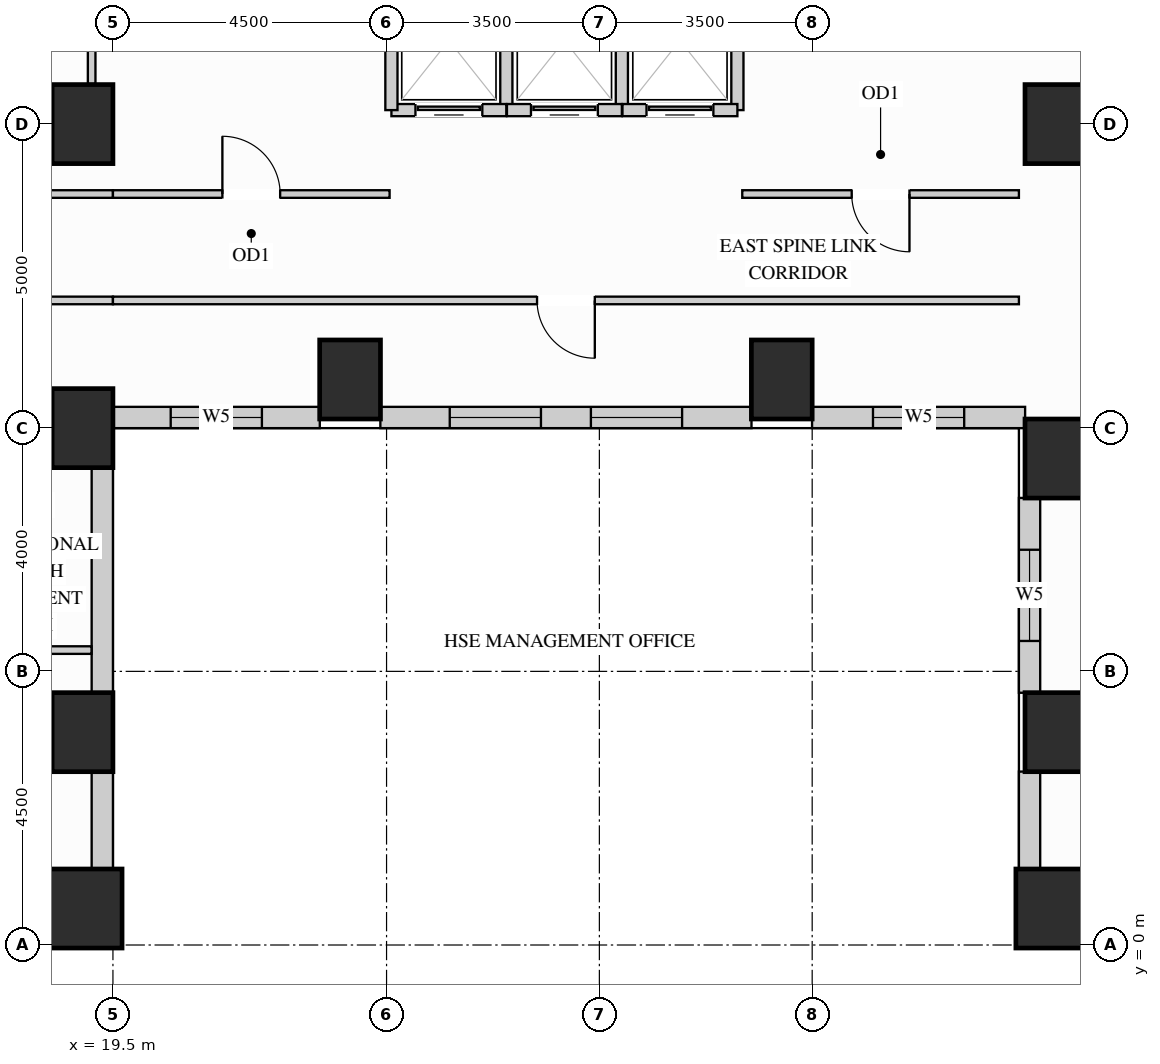
"""IFC4 building model, lengths in metres.
Left out: names, types, materials, properties, quantities, classifications, styles, units other than length and angle.
Written with IfcOpenShell. Run it as: python <this file> out.ifc"""

import sys

from ifc_helpers import new_model, si_unit, direction, frame, frame_2d, origin, origin_2d, place, context, subcontext, project, spatial, rectangle, extrude, source, transform, mapped, element, fill, save


model = new_model("IFC4")
c1 = context("Model", 3, precision=1e-05, world=origin(), true_north=direction((0.0, 1.0)))
c2 = subcontext(c1, "Body", "Model", "MODEL_VIEW")
j1 = project(units=[si_unit("LENGTHUNIT", "METRE"), si_unit("PLANEANGLEUNIT", "RADIAN")], contexts=[c1])
p1 = place(None, origin())
s1 = spatial("IfcSite", under=j1, at=p1, CompositionType="ELEMENT")
p2 = place(p1, origin())
s2 = spatial("IfcBuilding", under=s1, at=p2, CompositionType="ELEMENT")
p3 = place(p2, frame((0.0, 0.0, 54.9)))
s3 = spatial("IfcBuildingStorey", under=s2, at=p3, CompositionType="ELEMENT", Elevation=54.9)
m1 = source(origin(), c2, "Body", "SweptSolid", [
    extrude(rectangle(XDim=1.0, YDim=1.3, at=origin_2d()), origin(), (0.0, 0.0, 1.0), 3.38),
])
for number, where, z_axis, x_axis in (
    (1, (19.0, 13.5, 0.0), (0.0, 0.0, 1.0), (1.0, 0.0, 0.0)),
    (2, (19.0, 3.5, 0.0), (0.0, 0.0, 1.0), (1.0, 0.0, 0.0)),
    (3, (19.0, 8.5, 0.0), (0.0, 0.0, 1.0), (1.0, 0.0, 0.0)),
    (4, (35.0, 13.5, 0.0), (0.0, 0.0, 1.0), (1.0, 0.0, 0.0)),
    (5, (35.0, 3.5, 0.0), (0.0, 0.0, 1.0), (1.0, 0.0, 0.0)),
    (6, (35.0, 8.0, 0.0), (0.0, 0.0, 1.0), (1.0, 0.0, 0.0)),
    (7, (23.4, 9.3, 0.0), (0.0, 0.0, 1.0), (1.0, 0.0, 0.0)),
    (8, (30.5, 9.3, 0.0), (0.0, 0.0, 1.0), (1.0, 0.0, 0.0)),
):
    element("IfcColumn", number, at=place(p3, frame(where, z_axis=z_axis, x_axis=x_axis)), inside=s3, PredefinedType="COLUMN", context=c2, shape_type="MappedRepresentation", body=[
        mapped(m1, transform((0.0, 0.0, 0.0), x_axis=(1.0, 0.0, 0.0), y_axis=(0.0, 1.0, 0.0), z_axis=(0.0, 0.0, 1.0))),
    ])
m2 = source(origin(), c2, "Body", "SweptSolid", [
    extrude(rectangle(XDim=1.3, YDim=1.3, at=origin_2d()), origin(), (0.0, 0.0, 1.0), 3.38),
])
for number, where, z_axis, x_axis in (
    (9, (19.0, 0.6, 0.0), (0.0, 0.0, 1.0), (1.0, 0.0, 0.0)),
    (10, (35.0, 0.6, 0.0), (0.0, 0.0, 1.0), (1.0, 0.0, 0.0)),
):
    element("IfcColumn", number, at=place(p3, frame(where, z_axis=z_axis, x_axis=x_axis)), inside=s3, PredefinedType="COLUMN", context=c2, shape_type="MappedRepresentation", body=[
        mapped(m2, transform((0.0, 0.0, 0.0), x_axis=(1.0, 0.0, 0.0), y_axis=(0.0, 1.0, 0.0), z_axis=(0.0, 0.0, 1.0))),
    ])
m3 = source(origin(), c2, "Body", "SweptSolid", [
    extrude(rectangle(XDim=1.604, YDim=0.35, at=frame_2d((0.802, 0.0))), origin(), (0.0, 0.0, 1.0), 2.51),
])
p4 = place(p3, frame((19.325, 1.248, 0.0), z_axis=(0.0, 0.0, 1.0), x_axis=(0.0, 1.0, 0.0)))
e11 = element("IfcWall", 11, at=p4, inside=s3, PredefinedType="SOLIDWALL", context=c2, shape_type="MappedRepresentation", body=[
    mapped(m3, transform((0.0, 0.0, 0.0), x_axis=(1.0, 0.0, 0.0), y_axis=(0.0, 1.0, 0.0), z_axis=(0.0, 0.0, 1.0))),
])
m4 = source(origin(), c2, "Body", "SweptSolid", [
    extrude(rectangle(XDim=3.704, YDim=0.35, at=frame_2d((1.852, 0.0))), origin(), (0.0, 0.0, 1.0), 2.51),
])
p5 = place(p3, frame((19.325, 4.148, 0.0), z_axis=(0.0, 0.0, 1.0), x_axis=(0.0, 1.0, 0.0)))
e12 = element("IfcWall", 12, at=p5, inside=s3, PredefinedType="SOLIDWALL", context=c2, shape_type="MappedRepresentation", body=[
    mapped(m4, transform((0.0, 0.0, 0.0), x_axis=(1.0, 0.0, 0.0), y_axis=(0.0, 1.0, 0.0), z_axis=(0.0, 0.0, 1.0))),
])
p6 = place(p3, frame((19.498, 8.675, 0.0), z_axis=(0.0, 0.0, 1.0), x_axis=(1.0, 0.0, 0.0)))
e13 = element("IfcWall", 13, at=p6, inside=s3, PredefinedType="SOLIDWALL", context=c2, shape_type="SweptSolid", body=[
    extrude(rectangle(XDim=3.404, YDim=0.35, at=frame_2d((1.702, 0.0))), origin(), (0.0, 0.0, 1.0), 3.365),
])
p7 = place(p6, frame((0.952, 0.0, 0.78)))
e14 = element("IfcOpeningElement", 14, at=p7, cuts=e13, PredefinedType="OPENING", context=c2, shape_type="SweptSolid", body=[
    extrude(rectangle(XDim=1.5, YDim=2.0, at=frame_2d((0.75, 1.0))), frame((0.0, 0.185, 0.0), z_axis=(0.0, -1.0, 0.0), x_axis=(1.0, 0.0, 0.0)), (0.0, 0.0, 1.0), 0.37),
])
p8 = place(p3, frame((23.898, 8.675, 0.0), z_axis=(0.0, 0.0, 1.0), x_axis=(1.0, 0.0, 0.0)))
e15 = element("IfcWall", 15, at=p8, inside=s3, PredefinedType="SOLIDWALL", context=c2, shape_type="SweptSolid", body=[
    extrude(rectangle(XDim=6.104, YDim=0.35, at=frame_2d((3.052, 0.0))), origin(), (0.0, 0.0, 1.0), 3.365),
])
p9 = place(p8, frame((1.141, 0.0, 0.78)))
e16 = element("IfcOpeningElement", 16, at=p9, cuts=e15, PredefinedType="OPENING", context=c2, shape_type="SweptSolid", body=[
    extrude(rectangle(XDim=1.5, YDim=2.0, at=frame_2d((0.75, 1.0))), frame((0.0, 0.185, 0.0), z_axis=(0.0, -1.0, 0.0), x_axis=(1.0, 0.0, 0.0)), (0.0, 0.0, 1.0), 0.37),
])
p10 = place(p8, frame((3.463, 0.0, 0.78)))
e17 = element("IfcOpeningElement", 17, at=p10, cuts=e15, PredefinedType="OPENING", context=c2, shape_type="SweptSolid", body=[
    extrude(rectangle(XDim=1.5, YDim=2.0, at=frame_2d((0.75, 1.0))), frame((0.0, 0.185, 0.0), z_axis=(0.0, -1.0, 0.0), x_axis=(1.0, 0.0, 0.0)), (0.0, 0.0, 1.0), 0.37),
])
p11 = place(p3, frame((30.998, 8.675, 0.0), z_axis=(0.0, 0.0, 1.0), x_axis=(1.0, 0.0, 0.0)))
e18 = element("IfcWall", 18, at=p11, inside=s3, PredefinedType="SOLIDWALL", context=c2, shape_type="SweptSolid", body=[
    extrude(rectangle(XDim=3.504, YDim=0.35, at=frame_2d((1.752, 0.0))), origin(), (0.0, 0.0, 1.0), 3.365),
])
p12 = place(p11, frame((1.002, 0.0, 0.78)))
e19 = element("IfcOpeningElement", 19, at=p12, cuts=e18, PredefinedType="OPENING", context=c2, shape_type="SweptSolid", body=[
    extrude(rectangle(XDim=1.5, YDim=2.0, at=frame_2d((0.75, 1.0))), frame((0.0, 0.185, 0.0), z_axis=(0.0, -1.0, 0.0), x_axis=(1.0, 0.0, 0.0)), (0.0, 0.0, 1.0), 0.37),
])
p13 = place(p3, frame((34.575, 7.352, 0.0), z_axis=(0.0, 0.0, 1.0), x_axis=(0.0, -1.0, 0.0)))
e20 = element("IfcWall", 20, at=p13, inside=s3, PredefinedType="SOLIDWALL", context=c2, shape_type="SweptSolid", body=[
    extrude(rectangle(XDim=3.204, YDim=0.35, at=frame_2d((1.602, 0.0))), origin(), (0.0, 0.0, 1.0), 2.51),
])
p14 = place(p13, frame((0.852, 0.0, 0.78)))
e21 = element("IfcOpeningElement", 21, at=p14, cuts=e20, PredefinedType="OPENING", context=c2, shape_type="SweptSolid", body=[
    extrude(rectangle(XDim=1.5, YDim=1.55, at=frame_2d((0.75, 0.775))), frame((0.0, 0.185, 0.0), z_axis=(0.0, -1.0, 0.0), x_axis=(1.0, 0.0, 0.0)), (0.0, 0.0, 1.0), 0.37),
])
p15 = place(p3, frame((34.575, 2.852, 0.0), z_axis=(0.0, 0.0, 1.0), x_axis=(0.0, -1.0, 0.0)))
e22 = element("IfcWall", 22, at=p15, inside=s3, PredefinedType="SOLIDWALL", context=c2, shape_type="MappedRepresentation", body=[
    mapped(m3, transform((0.0, 0.0, 0.0), x_axis=(1.0, 0.0, 0.0), y_axis=(0.0, 1.0, 0.0), z_axis=(0.0, 0.0, 1.0))),
])
m5 = source(origin(), c2, "Body", "SweptSolid", [
    extrude(rectangle(XDim=3.18, YDim=0.125, at=frame_2d((1.59, 0.0))), origin(), (0.0, 0.0, 1.0), 2.67),
])
p16 = place(p3, frame((19.15, 14.16, 0.0), z_axis=(0.0, 0.0, 1.0), x_axis=(0.0, 1.0, 0.0)))
e23 = element("IfcWall", 23, at=p16, inside=s3, PredefinedType="PARTITIONING", context=c2, shape_type="MappedRepresentation", body=[
    mapped(m5, transform((0.0, 0.0, 0.0), x_axis=(1.0, 0.0, 0.0), y_axis=(0.0, 1.0, 0.0), z_axis=(0.0, 0.0, 1.0))),
])
p17 = place(p3, frame((29.85, 12.35, 0.0), z_axis=(0.0, 0.0, 1.0), x_axis=(1.0, 0.0, 0.0)))
e24 = element("IfcWall", 24, at=p17, inside=s3, PredefinedType="PARTITIONING", context=c2, shape_type="SweptSolid", body=[
    extrude(rectangle(XDim=4.55, YDim=0.125, at=frame_2d((2.275, 0.0))), origin(), (0.0, 0.0, 1.0), 3.365),
])
p18 = place(p17, frame((1.8, 0.0, 0.0)))
e25 = element("IfcOpeningElement", 25, at=p18, cuts=e24, PredefinedType="OPENING", context=c2, shape_type="SweptSolid", body=[
    extrude(rectangle(XDim=0.95, YDim=2.15, at=frame_2d((0.475, 1.075))), frame((0.0, 0.073, 0.0), z_axis=(0.0, -1.0, 0.0), x_axis=(1.0, 0.0, 0.0)), (0.0, 0.0, 1.0), 0.145),
])
m6 = source(origin(), c2, "Body", "SweptSolid", [
    extrude(rectangle(XDim=2.45, YDim=0.125, at=frame_2d((1.225, 0.0))), origin(), (0.0, 0.0, 1.0), 3.365),
])
p19 = place(p3, frame((17.05, 12.35, 0.0), z_axis=(0.0, 0.0, 1.0), x_axis=(1.0, 0.0, 0.0)))
e26 = element("IfcWall", 26, at=p19, inside=s3, PredefinedType="PARTITIONING", context=c2, shape_type="MappedRepresentation", body=[
    mapped(m6, transform((0.0, 0.0, 0.0), x_axis=(1.0, 0.0, 0.0), y_axis=(0.0, 1.0, 0.0), z_axis=(0.0, 0.0, 1.0))),
])
p20 = place(p3, frame((19.5, 12.35, 0.0), z_axis=(0.0, 0.0, 1.0), x_axis=(1.0, 0.0, 0.0)))
e27 = element("IfcWall", 27, at=p20, inside=s3, PredefinedType="PARTITIONING", context=c2, shape_type="SweptSolid", body=[
    extrude(rectangle(XDim=4.55, YDim=0.125, at=frame_2d((2.275, 0.0))), origin(), (0.0, 0.0, 1.0), 3.365),
])
p21 = place(p20, frame((1.8, 0.0, 0.0)))
e28 = element("IfcOpeningElement", 28, at=p21, cuts=e27, PredefinedType="OPENING", context=c2, shape_type="SweptSolid", body=[
    extrude(rectangle(XDim=0.95, YDim=2.15, at=frame_2d((0.475, 1.075))), frame((0.0, 0.073, 0.0), z_axis=(0.0, -1.0, 0.0), x_axis=(1.0, 0.0, 0.0)), (0.0, 0.0, 1.0), 0.145),
])
p22 = place(p3, frame((17.05, 10.6, 0.0), z_axis=(0.0, 0.0, 1.0), x_axis=(1.0, 0.0, 0.0)))
e29 = element("IfcWall", 29, at=p22, inside=s3, PredefinedType="PARTITIONING", context=c2, shape_type="MappedRepresentation", body=[
    mapped(m6, transform((0.0, 0.0, 0.0), x_axis=(1.0, 0.0, 0.0), y_axis=(0.0, 1.0, 0.0), z_axis=(0.0, 0.0, 1.0))),
])
p23 = place(p3, frame((19.5, 10.6, 0.0), z_axis=(0.0, 0.0, 1.0), x_axis=(1.0, 0.0, 0.0)))
e30 = element("IfcWall", 30, at=p23, inside=s3, PredefinedType="PARTITIONING", context=c2, shape_type="SweptSolid", body=[
    extrude(rectangle(XDim=14.9, YDim=0.125, at=frame_2d((7.45, 0.0))), origin(), (0.0, 0.0, 1.0), 3.365),
])
p24 = place(p23, frame((6.975, 0.0, 0.0)))
e31 = element("IfcOpeningElement", 31, at=p24, cuts=e30, PredefinedType="OPENING", context=c2, shape_type="SweptSolid", body=[
    extrude(rectangle(XDim=0.95, YDim=2.15, at=frame_2d((0.475, 1.075))), frame((0.0, 0.073, 0.0), z_axis=(0.0, -1.0, 0.0), x_axis=(1.0, 0.0, 0.0)), (0.0, 0.0, 1.0), 0.145),
])
m7 = source(origin(), c2, "Body", "SweptSolid", [
    extrude(rectangle(XDim=2.098, YDim=0.125, at=frame_2d((1.049, 0.0))), origin(), (0.0, 0.0, 1.0), 2.828),
])
p25 = place(p3, frame((17.05, 4.85, 0.0), z_axis=(0.0, 0.0, 1.0), x_axis=(1.0, 0.0, 0.0)))
e32 = element("IfcWall", 32, at=p25, inside=s3, PredefinedType="PARTITIONING", context=c2, shape_type="MappedRepresentation", body=[
    mapped(m7, transform((0.0, 0.0, 0.0), x_axis=(1.0, 0.0, 0.0), y_axis=(0.0, 1.0, 0.0), z_axis=(0.0, 0.0, 1.0))),
])
m8 = source(origin(), c2, "Body", "SweptSolid", [
    extrude(rectangle(XDim=2.29, YDim=0.2, at=frame_2d((1.145, 0.0))), origin(), (0.0, 0.0, 1.0), 3.365),
])
p26 = place(p3, frame((25.97, 13.73, 0.0), z_axis=(0.0, 0.0, 1.0), x_axis=(0.0, 1.0, 0.0)))
e33 = element("IfcWall", 33, at=p26, inside=s3, PredefinedType="PARTITIONING", context=c2, shape_type="MappedRepresentation", body=[
    mapped(m8, transform((0.0, 0.0, 0.0), x_axis=(1.0, 0.0, 0.0), y_axis=(0.0, 1.0, 0.0), z_axis=(0.0, 0.0, 1.0))),
])
p27 = place(p3, frame((24.08, 13.73, 0.0), z_axis=(0.0, 0.0, 1.0), x_axis=(1.0, 0.0, 0.0)))
e34 = element("IfcWall", 34, at=p27, inside=s3, PredefinedType="PARTITIONING", context=c2, shape_type="SweptSolid", body=[
    extrude(rectangle(XDim=1.89, YDim=0.2, at=frame_2d((0.945, 0.0))), origin(), (0.0, 0.0, 1.0), 2.446),
])
p28 = place(p27, frame((0.395, 0.0, 0.0)))
e35 = element("IfcOpeningElement", 35, at=p28, cuts=e34, PredefinedType="OPENING", context=c2, shape_type="SweptSolid", body=[
    extrude(rectangle(XDim=1.1, YDim=2.2, at=frame_2d((0.55, 1.1))), frame((0.0, 0.11, 0.0), z_axis=(0.0, -1.0, 0.0), x_axis=(1.0, 0.0, 0.0)), (0.0, 0.0, 1.0), 0.22),
])
for number, where, z_axis, x_axis in (
    (36, (24.08, 13.73, 0.0), (0.0, 0.0, 1.0), (0.0, 1.0, 0.0)),
    (37, (27.87, 13.73, 0.0), (0.0, 0.0, 1.0), (0.0, 1.0, 0.0)),
):
    element("IfcWall", number, at=place(p3, frame(where, z_axis=z_axis, x_axis=x_axis)), inside=s3, PredefinedType="PARTITIONING", context=c2, shape_type="MappedRepresentation", body=[
        mapped(m8, transform((0.0, 0.0, 0.0), x_axis=(1.0, 0.0, 0.0), y_axis=(0.0, 1.0, 0.0), z_axis=(0.0, 0.0, 1.0))),
    ])
p29 = place(p3, frame((25.98, 13.73, 0.0), z_axis=(0.0, 0.0, 1.0), x_axis=(1.0, 0.0, 0.0)))
e38 = element("IfcWall", 38, at=p29, inside=s3, PredefinedType="PARTITIONING", context=c2, shape_type="SweptSolid", body=[
    extrude(rectangle(XDim=1.89, YDim=0.2, at=frame_2d((0.945, 0.0))), origin(), (0.0, 0.0, 1.0), 2.446),
])
p30 = place(p29, frame((0.395, 0.0, 0.0)))
e39 = element("IfcOpeningElement", 39, at=p30, cuts=e38, PredefinedType="OPENING", context=c2, shape_type="SweptSolid", body=[
    extrude(rectangle(XDim=1.1, YDim=2.2, at=frame_2d((0.55, 1.1))), frame((0.0, 0.11, 0.0), z_axis=(0.0, -1.0, 0.0), x_axis=(1.0, 0.0, 0.0)), (0.0, 0.0, 1.0), 0.22),
])
p31 = place(p3, frame((29.77, 13.73, 0.0), z_axis=(0.0, 0.0, 1.0), x_axis=(0.0, 1.0, 0.0)))
e40 = element("IfcWall", 40, at=p31, inside=s3, PredefinedType="PARTITIONING", context=c2, shape_type="MappedRepresentation", body=[
    mapped(m8, transform((0.0, 0.0, 0.0), x_axis=(1.0, 0.0, 0.0), y_axis=(0.0, 1.0, 0.0), z_axis=(0.0, 0.0, 1.0))),
])
p32 = place(p3, frame((27.88, 13.73, 0.0), z_axis=(0.0, 0.0, 1.0), x_axis=(1.0, 0.0, 0.0)))
e41 = element("IfcWall", 41, at=p32, inside=s3, PredefinedType="PARTITIONING", context=c2, shape_type="SweptSolid", body=[
    extrude(rectangle(XDim=1.89, YDim=0.2, at=frame_2d((0.945, 0.0))), origin(), (0.0, 0.0, 1.0), 2.446),
])
p33 = place(p32, frame((0.395, 0.0, 0.0)))
e42 = element("IfcOpeningElement", 42, at=p33, cuts=e41, PredefinedType="OPENING", context=c2, shape_type="SweptSolid", body=[
    extrude(rectangle(XDim=1.1, YDim=2.2, at=frame_2d((0.55, 1.1))), frame((0.0, 0.11, 0.0), z_axis=(0.0, -1.0, 0.0), x_axis=(1.0, 0.0, 0.0)), (0.0, 0.0, 1.0), 0.22),
])
m9 = source(origin(), c2, "Body", "SweptSolid", [
    extrude(rectangle(XDim=1.1, YDim=2.2, at=frame_2d((0.55, 1.1))), frame((0.0, 0.025, 0.0), z_axis=(0.0, -1.0, 0.0), x_axis=(1.0, 0.0, 0.0)), (0.0, 0.0, 1.0), 0.05),
])
p34 = place(p28, origin())
e43 = element("IfcDoor", 43, at=p34, inside=s3, OperationType="SLIDING_TO_LEFT", PredefinedType="DOOR", context=c2, shape_type="MappedRepresentation", body=[
    mapped(m9, transform((0.0, 0.0, 0.0), x_axis=(1.0, 0.0, 0.0), y_axis=(0.0, 1.0, 0.0), z_axis=(0.0, 0.0, 1.0))),
])
fill(e35, e43)
p35 = place(p30, origin())
e44 = element("IfcDoor", 44, at=p35, inside=s3, OperationType="SLIDING_TO_LEFT", PredefinedType="DOOR", context=c2, shape_type="MappedRepresentation", body=[
    mapped(m9, transform((0.0, 0.0, 0.0), x_axis=(1.0, 0.0, 0.0), y_axis=(0.0, 1.0, 0.0), z_axis=(0.0, 0.0, 1.0))),
])
fill(e39, e44)
p36 = place(p33, origin())
e45 = element("IfcDoor", 45, at=p36, inside=s3, OperationType="SLIDING_TO_LEFT", PredefinedType="DOOR", context=c2, shape_type="MappedRepresentation", body=[
    mapped(m9, transform((0.0, 0.0, 0.0), x_axis=(1.0, 0.0, 0.0), y_axis=(0.0, 1.0, 0.0), z_axis=(0.0, 0.0, 1.0))),
])
fill(e42, e45)
m10 = source(origin(), c2, "Body", "SweptSolid", [
    extrude(rectangle(XDim=0.95, YDim=2.15, at=frame_2d((0.475, 1.075))), frame((0.0, 0.025, 0.0), z_axis=(0.0, -1.0, 0.0), x_axis=(1.0, 0.0, 0.0)), (0.0, 0.0, 1.0), 0.05),
])
p37 = place(p21, origin())
e46 = element("IfcDoor", 46, at=p37, inside=s3, OperationType="SINGLE_SWING_LEFT", PredefinedType="DOOR", context=c2, shape_type="MappedRepresentation", body=[
    mapped(m10, transform((0.0, 0.0, 0.0), x_axis=(1.0, 0.0, 0.0), y_axis=(0.0, 1.0, 0.0), z_axis=(0.0, 0.0, 1.0))),
])
fill(e28, e46)
p38 = place(p18, origin())
e47 = element("IfcDoor", 47, at=p38, inside=s3, OperationType="SINGLE_SWING_RIGHT", PredefinedType="DOOR", context=c2, shape_type="MappedRepresentation", body=[
    mapped(m10, transform((0.0, 0.0, 0.0), x_axis=(1.0, 0.0, 0.0), y_axis=(0.0, 1.0, 0.0), z_axis=(0.0, 0.0, 1.0))),
])
fill(e25, e47)
p39 = place(p24, origin())
e48 = element("IfcDoor", 48, at=p39, inside=s3, OperationType="SINGLE_SWING_RIGHT", PredefinedType="DOOR", context=c2, shape_type="MappedRepresentation", body=[
    mapped(m10, transform((0.0, 0.0, 0.0), x_axis=(1.0, 0.0, 0.0), y_axis=(0.0, 1.0, 0.0), z_axis=(0.0, 0.0, 1.0))),
])
fill(e31, e48)
m11 = source(origin(), c2, "Body", "SweptSolid", [
    extrude(rectangle(XDim=1.5, YDim=2.0, at=frame_2d((0.75, 1.0))), frame((0.0, 0.03, 0.0), z_axis=(0.0, -1.0, 0.0), x_axis=(1.0, 0.0, 0.0)), (0.0, 0.0, 1.0), 0.06),
])
p40 = place(p7, origin())
e49 = element("IfcWindow", 49, at=p40, inside=s3, PartitioningType="SINGLE_PANEL", PredefinedType="WINDOW", context=c2, shape_type="MappedRepresentation", body=[
    mapped(m11, transform((0.0, 0.0, 0.0), x_axis=(1.0, 0.0, 0.0), y_axis=(0.0, 1.0, 0.0), z_axis=(0.0, 0.0, 1.0))),
])
fill(e14, e49)
p41 = place(p9, origin())
e50 = element("IfcWindow", 50, at=p41, inside=s3, PartitioningType="SINGLE_PANEL", PredefinedType="WINDOW", context=c2, shape_type="MappedRepresentation", body=[
    mapped(m11, transform((0.0, 0.0, 0.0), x_axis=(1.0, 0.0, 0.0), y_axis=(0.0, 1.0, 0.0), z_axis=(0.0, 0.0, 1.0))),
])
fill(e16, e50)
p42 = place(p10, origin())
e51 = element("IfcWindow", 51, at=p42, inside=s3, PartitioningType="SINGLE_PANEL", PredefinedType="WINDOW", context=c2, shape_type="MappedRepresentation", body=[
    mapped(m11, transform((0.0, 0.0, 0.0), x_axis=(1.0, 0.0, 0.0), y_axis=(0.0, 1.0, 0.0), z_axis=(0.0, 0.0, 1.0))),
])
fill(e17, e51)
p43 = place(p12, origin())
e52 = element("IfcWindow", 52, at=p43, inside=s3, PartitioningType="SINGLE_PANEL", PredefinedType="WINDOW", context=c2, shape_type="MappedRepresentation", body=[
    mapped(m11, transform((0.0, 0.0, 0.0), x_axis=(1.0, 0.0, 0.0), y_axis=(0.0, 1.0, 0.0), z_axis=(0.0, 0.0, 1.0))),
])
fill(e19, e52)
m12 = source(origin(), c2, "Body", "SweptSolid", [
    extrude(rectangle(XDim=1.5, YDim=1.55, at=frame_2d((0.75, 0.775))), frame((0.0, 0.03, 0.0), z_axis=(0.0, -1.0, 0.0), x_axis=(1.0, 0.0, 0.0)), (0.0, 0.0, 1.0), 0.06),
])
p44 = place(p14, origin())
e53 = element("IfcWindow", 53, at=p44, inside=s3, PartitioningType="SINGLE_PANEL", PredefinedType="WINDOW", context=c2, shape_type="MappedRepresentation", body=[
    mapped(m12, transform((0.0, 0.0, 0.0), x_axis=(1.0, 0.0, 0.0), y_axis=(0.0, 1.0, 0.0), z_axis=(0.0, 0.0, 1.0))),
])
fill(e21, e53)
save(model, sys.argv[1])
